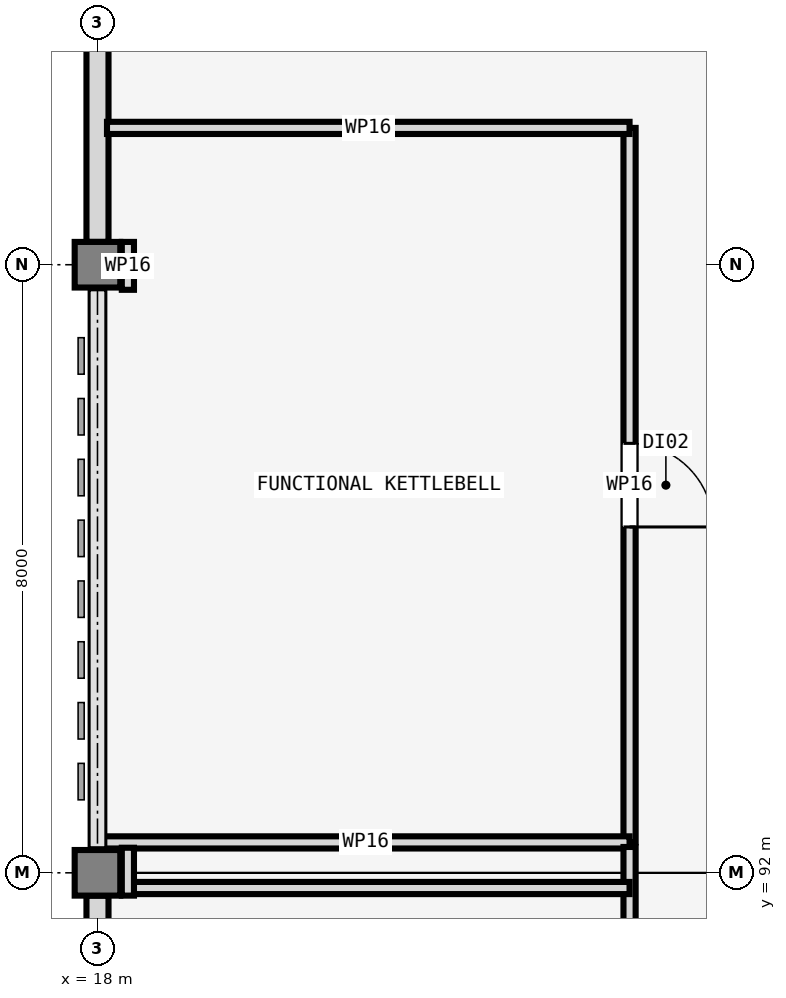
"""IFC4 building model, lengths in metres.
Left out: names, types, materials, properties, quantities, classifications, styles, units other than length and angle.
Written with IfcOpenShell. Run it as: python <this file> out.ifc"""

import sys

from ifc_helpers import new_model, si_unit, direction, frame, frame_2d, origin, origin_2d, place, context, subcontext, project, spatial, rectangle, extrude, element, fill, save


model = new_model("IFC4")
c1 = context("Model", 3, precision=1e-05, world=origin(), true_north=direction((0.0, 1.0)))
c2 = subcontext(c1, "Body", "Model", "MODEL_VIEW")
j1 = project(units=[si_unit("LENGTHUNIT", "METRE"), si_unit("PLANEANGLEUNIT", "RADIAN")], contexts=[c1])
p1 = place(None, origin())
s1 = spatial("IfcSite", under=j1, at=p1, CompositionType="ELEMENT")
p2 = place(p1, origin())
s2 = spatial("IfcBuilding", under=s1, at=p2, CompositionType="ELEMENT")
p3 = place(p2, frame((0.0, 0.0, 4.8)))
s3 = spatial("IfcBuildingStorey", under=s2, at=p3, CompositionType="ELEMENT", Elevation=4.8)
for number, where, z_axis, x_axis in (
    (1, (18.0, 92.0, 0.0), (0.0, 0.0, 1.0), (1.0, 0.0, 0.0)),
    (2, (18.0, 100.0, 0.0), (0.0, 0.0, 1.0), (1.0, 0.0, 0.0)),
):
    element("IfcColumn", number, at=place(p3, frame(where, z_axis=z_axis, x_axis=x_axis)), inside=s3, PredefinedType="COLUMN", context=c2, shape_type="SweptSolid", body=[
        extrude(rectangle(XDim=0.6, YDim=0.6, at=origin_2d()), origin(), (0.0, 0.0, 1.0), 4.5),
    ])
p4 = place(p3, frame((18.0, 91.7, 0.0), z_axis=(0.0, 0.0, 1.0), x_axis=(0.0, -1.0, 0.0)))
e3 = element("IfcWall", 3, at=p4, inside=s3, PredefinedType="SOLIDWALL", context=c2, shape_type="SweptSolid", body=[
    extrude(rectangle(XDim=7.4, YDim=0.29, at=frame_2d((3.7, 0.0))), origin(), (0.0, 0.0, 1.0), 3.5),
])
p5 = place(p4, frame((2.85, 0.0, 0.95)))
e4 = element("IfcOpeningElement", 4, at=p5, cuts=e3, PredefinedType="OPENING", context=c2, shape_type="SweptSolid", body=[
    extrude(rectangle(XDim=1.7, YDim=1.55, at=frame_2d((0.85, 0.775))), frame((0.0, 0.155, 0.0), z_axis=(0.0, -1.0, 0.0), x_axis=(1.0, 0.0, 0.0)), (0.0, 0.0, 1.0), 0.31),
])
p6 = place(p3, frame((18.0, 107.7, 0.0), z_axis=(0.0, 0.0, 1.0), x_axis=(0.0, -1.0, 0.0)))
e5 = element("IfcWall", 5, at=p6, inside=s3, PredefinedType="SOLIDWALL", context=c2, shape_type="SweptSolid", body=[
    extrude(rectangle(XDim=7.4, YDim=0.29, at=frame_2d((3.7, 0.0))), origin(), (0.0, 0.0, 1.0), 3.5),
])
p7 = place(p6, frame((2.85, 0.0, 0.95)))
e6 = element("IfcOpeningElement", 6, at=p7, cuts=e5, PredefinedType="OPENING", context=c2, shape_type="SweptSolid", body=[
    extrude(rectangle(XDim=1.7, YDim=1.55, at=frame_2d((0.85, 0.775))), frame((0.0, 0.155, 0.0), z_axis=(0.0, -1.0, 0.0), x_axis=(1.0, 0.0, 0.0)), (0.0, 0.0, 1.0), 0.31),
])
p8 = place(p3, frame((25.0, 101.8, 0.0), z_axis=(0.0, 0.0, 1.0), x_axis=(0.0, -1.0, 0.0)))
e7 = element("IfcWall", 7, at=p8, inside=s3, PredefinedType="PARTITIONING", context=c2, shape_type="SweptSolid", body=[
    extrude(rectangle(XDim=9.4, YDim=0.16, at=frame_2d((4.7, 0.0))), origin(), (0.0, 0.0, 1.0), 3.4),
])
p9 = place(p8, frame((4.15, 0.0, 0.0)))
e8 = element("IfcOpeningElement", 8, at=p9, cuts=e7, PredefinedType="OPENING", context=c2, shape_type="SweptSolid", body=[
    extrude(rectangle(XDim=1.1, YDim=2.1, at=frame_2d((0.55, 1.05))), frame((0.0, 0.09, 0.0), z_axis=(0.0, -1.0, 0.0), x_axis=(1.0, 0.0, 0.0)), (0.0, 0.0, 1.0), 0.18),
])
p10 = place(p3, frame((18.125, 101.8, 0.0), z_axis=(0.0, 0.0, 1.0), x_axis=(1.0, 0.0, 0.0)))
e9 = element("IfcWall", 9, at=p10, inside=s3, PredefinedType="PARTITIONING", context=c2, shape_type="SweptSolid", body=[
    extrude(rectangle(XDim=6.875, YDim=0.16, at=frame_2d((3.438, 0.0))), origin(), (0.0, 0.0, 1.0), 3.4),
])
p11 = place(p3, frame((18.4, 99.67, 0.0), z_axis=(0.0, 0.0, 1.0), x_axis=(0.0, 1.0, 0.0)))
e10 = element("IfcWall", 10, at=p11, inside=s3, PredefinedType="PARTITIONING", context=c2, shape_type="SweptSolid", body=[
    extrude(rectangle(XDim=0.63, YDim=0.16, at=frame_2d((0.315, 0.0))), origin(), (0.0, 0.0, 1.0), 3.4),
])
p12 = place(p3, frame((25.0, 92.4, 0.0), z_axis=(0.0, 0.0, 1.0), x_axis=(-1.0, 0.0, 0.0)))
e11 = element("IfcWall", 11, at=p12, inside=s3, PredefinedType="PARTITIONING", context=c2, shape_type="SweptSolid", body=[
    extrude(rectangle(XDim=6.942, YDim=0.16, at=frame_2d((3.471, 0.0))), origin(), (0.0, 0.0, 1.0), 3.4),
])
p13 = place(p3, frame((25.0, 92.34, 0.0), z_axis=(0.0, 0.0, 1.0), x_axis=(0.0, -1.0, 0.0)))
e12 = element("IfcWall", 12, at=p13, inside=s3, PredefinedType="PARTITIONING", context=c2, shape_type="SweptSolid", body=[
    extrude(rectangle(XDim=33.94, YDim=0.16, at=frame_2d((16.97, 0.0))), origin(), (0.0, 0.0, 1.0), 3.4),
])
p14 = place(p13, frame((16.17, 0.0, 0.0)))
e13 = element("IfcOpeningElement", 13, at=p14, cuts=e12, PredefinedType="OPENING", context=c2, shape_type="SweptSolid", body=[
    extrude(rectangle(XDim=1.6, YDim=2.2, at=frame_2d((0.8, 1.1))), frame((0.0, 0.09, 0.0), z_axis=(0.0, -1.0, 0.0), x_axis=(1.0, 0.0, 0.0)), (0.0, 0.0, 1.0), 0.18),
])
p15 = place(p3, frame((18.4, 91.8, 0.0), z_axis=(0.0, 0.0, 1.0), x_axis=(1.0, 0.0, 0.0)))
e14 = element("IfcWall", 14, at=p15, inside=s3, PredefinedType="PARTITIONING", context=c2, shape_type="SweptSolid", body=[
    extrude(rectangle(XDim=6.6, YDim=0.16, at=frame_2d((3.3, 0.0))), origin(), (0.0, 0.0, 1.0), 3.4),
])
p16 = place(p3, frame((18.4, 91.7, 0.0), z_axis=(0.0, 0.0, 1.0), x_axis=(0.0, 1.0, 0.0)))
e15 = element("IfcWall", 15, at=p16, inside=s3, PredefinedType="PARTITIONING", context=c2, shape_type="SweptSolid", body=[
    extrude(rectangle(XDim=0.63, YDim=0.16, at=frame_2d((0.315, 0.0))), origin(), (0.0, 0.0, 1.0), 3.4),
])
p17 = place(p9, origin())
e16 = element("IfcDoor", 16, at=p17, inside=s3, OperationType="SINGLE_SWING_RIGHT", PredefinedType="DOOR", context=c2, shape_type="SweptSolid", body=[
    extrude(rectangle(XDim=1.1, YDim=2.1, at=frame_2d((0.55, 1.05))), frame((0.0, 0.025, 0.0), z_axis=(0.0, -1.0, 0.0), x_axis=(1.0, 0.0, 0.0)), (0.0, 0.0, 1.0), 0.05),
])
fill(e8, e16)
save(model, sys.argv[1])
